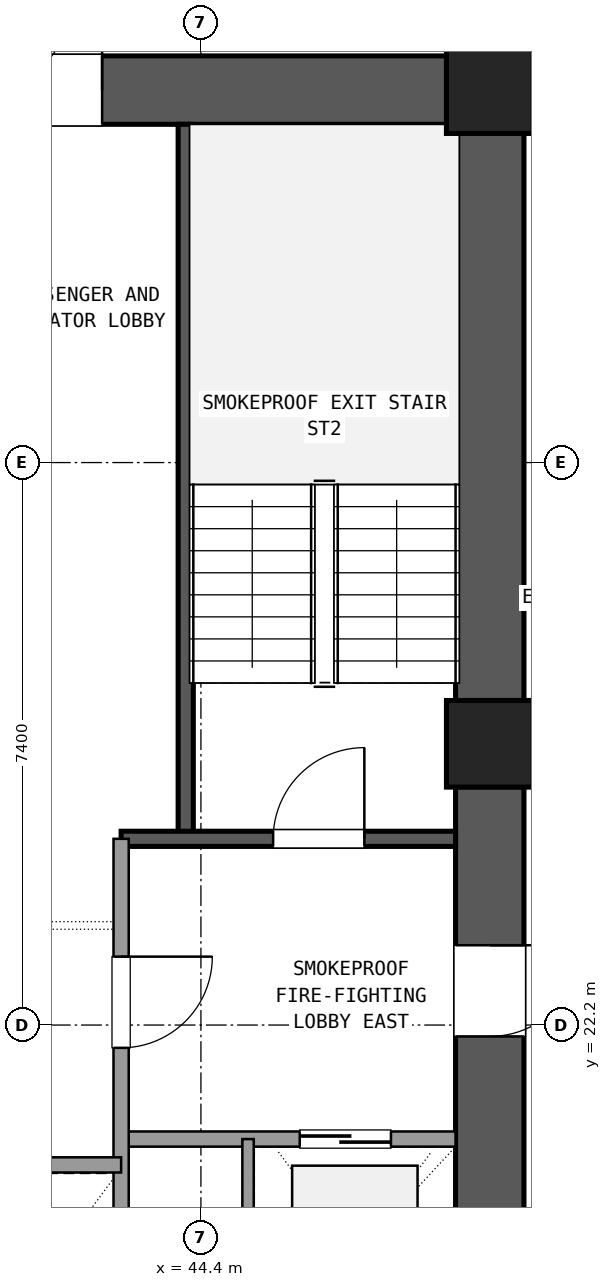
"""IFC4 building model, lengths in metres.
Left out: names, types, materials, properties, quantities, classifications, styles, units other than length and angle.
Written with IfcOpenShell. Run it as: python <this file> out.ifc"""

import sys

from ifc_helpers import new_model, si_unit, direction, frame, frame_2d, origin, origin_2d, place, context, subcontext, project, spatial, rectangle, extrude, element, fill, save


model = new_model("IFC4")
c1 = context("Model", 3, precision=1e-05, world=origin(), true_north=direction((0.0, 1.0)))
c2 = subcontext(c1, "Body", "Model", "MODEL_VIEW")
j1 = project(units=[si_unit("LENGTHUNIT", "METRE"), si_unit("PLANEANGLEUNIT", "RADIAN")], contexts=[c1])
p1 = place(None, origin())
s1 = spatial("IfcSite", under=j1, at=p1, CompositionType="ELEMENT")
p2 = place(p1, origin())
s2 = spatial("IfcBuilding", under=s1, at=p2, CompositionType="ELEMENT")
p3 = place(p2, frame((0.0, 0.0, 67.14)))
s3 = spatial("IfcBuildingStorey", under=s2, at=p3, CompositionType="ELEMENT", Elevation=67.14)
for number, where, z_axis, x_axis in (
    (1, (48.2, 25.9, 0.0), (0.0, 0.0, 1.0), (1.0, 0.0, 0.0)),
    (2, (48.2, 34.5, 0.0), (0.0, 0.0, 1.0), (1.0, 0.0, 0.0)),
):
    element("IfcColumn", number, at=place(p3, frame(where, z_axis=z_axis, x_axis=x_axis)), inside=s3, PredefinedType="COLUMN", context=c2, shape_type="SweptSolid", body=[
        extrude(rectangle(XDim=1.14, YDim=1.14, at=origin_2d()), origin(), (0.0, 0.0, 1.0), 3.6),
    ])
p4 = place(p3, frame((48.2, 17.865, 0.0), z_axis=(0.0, 0.0, 1.0), x_axis=(0.0, 1.0, 0.0)))
e3 = element("IfcWall", 3, at=p4, inside=s3, PredefinedType="SHEAR", context=c2, shape_type="SweptSolid", body=[
    extrude(rectangle(XDim=7.47, YDim=0.9, at=frame_2d((3.735, 0.0))), origin(), (0.0, 0.0, 1.0), 3.3),
])
p5 = place(p4, frame((4.185, 0.0, 0.0)))
e4 = element("IfcOpeningElement", 4, at=p5, cuts=e3, PredefinedType="OPENING", context=c2, shape_type="SweptSolid", body=[
    extrude(rectangle(XDim=1.2, YDim=2.15, at=frame_2d((0.6, 1.075))), frame((0.0, 0.46, 0.0), z_axis=(0.0, -1.0, 0.0), x_axis=(1.0, 0.0, 0.0)), (0.0, 0.0, 1.0), 0.92),
])
p6 = place(p3, frame((48.2, 26.465, 0.0), z_axis=(0.0, 0.0, 1.0), x_axis=(0.0, 1.0, 0.0)))
e5 = element("IfcWall", 5, at=p6, inside=s3, PredefinedType="SHEAR", context=c2, shape_type="SweptSolid", body=[
    extrude(rectangle(XDim=7.47, YDim=0.9, at=frame_2d((3.735, 0.0))), origin(), (0.0, 0.0, 1.0), 3.3),
])
p7 = place(p3, frame((47.635, 34.5, 0.0), z_axis=(0.0, 0.0, 1.0), x_axis=(-1.0, 0.0, 0.0)))
e6 = element("IfcWall", 6, at=p7, inside=s3, PredefinedType="SHEAR", context=c2, shape_type="SweptSolid", body=[
    extrude(rectangle(XDim=10.07, YDim=0.9, at=frame_2d((5.035, 0.0))), origin(), (0.0, 0.0, 1.0), 3.3),
])
p8 = place(p7, frame((4.535, 0.0, 0.0)))
e7 = element("IfcOpeningElement", 7, at=p8, cuts=e6, PredefinedType="OPENING", context=c2, shape_type="SweptSolid", body=[
    extrude(rectangle(XDim=1.6, YDim=2.2, at=frame_2d((0.8, 1.1))), frame((0.0, 0.46, 0.0), z_axis=(0.0, -1.0, 0.0), x_axis=(1.0, 0.0, 0.0)), (0.0, 0.0, 1.0), 0.92),
])
p9 = place(p3, frame((44.2, 24.65, 0.0), z_axis=(0.0, 0.0, 1.0), x_axis=(0.0, 1.0, 0.0)))
e8 = element("IfcWall", 8, at=p9, inside=s3, PredefinedType="SHEAR", context=c2, shape_type="SweptSolid", body=[
    extrude(rectangle(XDim=9.4, YDim=0.2, at=frame_2d((4.7, 0.0))), origin(), (0.0, 0.0, 1.0), 3.3),
])
p10 = place(p3, frame((43.35, 24.65, 0.0), z_axis=(0.0, 0.0, 1.0), x_axis=(1.0, 0.0, 0.0)))
e9 = element("IfcWall", 9, at=p10, inside=s3, PredefinedType="SHEAR", context=c2, shape_type="SweptSolid", body=[
    extrude(rectangle(XDim=4.4, YDim=0.2, at=frame_2d((2.2, 0.0))), origin(), (0.0, 0.0, 1.0), 3.3),
])
p11 = place(p10, frame((2.0, 0.0, 0.0)))
e10 = element("IfcOpeningElement", 10, at=p11, cuts=e9, PredefinedType="OPENING", context=c2, shape_type="SweptSolid", body=[
    extrude(rectangle(XDim=1.2, YDim=2.15, at=frame_2d((0.6, 1.075))), frame((0.0, 0.11, 0.0), z_axis=(0.0, -1.0, 0.0), x_axis=(1.0, 0.0, 0.0)), (0.0, 0.0, 1.0), 0.22),
])
p12 = place(p3, frame((43.35, 20.7, 0.0), z_axis=(0.0, 0.0, 1.0), x_axis=(1.0, 0.0, 0.0)))
e11 = element("IfcWall", 11, at=p12, inside=s3, PredefinedType="SOLIDWALL", context=c2, shape_type="SweptSolid", body=[
    extrude(rectangle(XDim=4.4, YDim=0.2, at=frame_2d((2.2, 0.0))), origin(), (0.0, 0.0, 1.0), 2.59),
])
p13 = place(p12, frame((2.35, 0.0, 0.0)))
e12 = element("IfcOpeningElement", 12, at=p13, cuts=e11, PredefinedType="OPENING", context=c2, shape_type="SweptSolid", body=[
    extrude(rectangle(XDim=1.2, YDim=2.15, at=frame_2d((0.6, 1.075))), frame((0.0, 0.11, 0.0), z_axis=(0.0, -1.0, 0.0), x_axis=(1.0, 0.0, 0.0)), (0.0, 0.0, 1.0), 0.22),
])
p14 = place(p3, frame((43.35, 17.75, 0.0), z_axis=(0.0, 0.0, 1.0), x_axis=(0.0, 1.0, 0.0)))
e13 = element("IfcWall", 13, at=p14, inside=s3, PredefinedType="SOLIDWALL", context=c2, shape_type="SweptSolid", body=[
    extrude(rectangle(XDim=6.9, YDim=0.2, at=frame_2d((3.45, 0.0))), origin(), (0.0, 0.0, 1.0), 2.59),
])
p15 = place(p14, frame((4.15, 0.0, 0.0)))
e14 = element("IfcOpeningElement", 14, at=p15, cuts=e13, PredefinedType="OPENING", context=c2, shape_type="SweptSolid", body=[
    extrude(rectangle(XDim=1.2, YDim=2.15, at=frame_2d((0.6, 1.075))), frame((0.0, 0.11, 0.0), z_axis=(0.0, -1.0, 0.0), x_axis=(1.0, 0.0, 0.0)), (0.0, 0.0, 1.0), 0.22),
])
p16 = place(p3, frame((45.02, 17.75, 0.0), z_axis=(0.0, 0.0, 1.0), x_axis=(0.0, 1.0, 0.0)))
e15 = element("IfcWall", 15, at=p16, inside=s3, PredefinedType="PARTITIONING", context=c2, shape_type="SweptSolid", body=[
    extrude(rectangle(XDim=2.95, YDim=0.15, at=frame_2d((1.475, 0.0))), origin(), (0.0, 0.0, 1.0), 2.59),
])
p17 = place(p3, frame((37.25, 20.36, 0.0), z_axis=(0.0, 0.0, 1.0), x_axis=(1.0, 0.0, 0.0)))
e16 = element("IfcWall", 16, at=p17, inside=s3, PredefinedType="SOLIDWALL", context=c2, shape_type="SweptSolid", body=[
    extrude(rectangle(XDim=6.1, YDim=0.2, at=frame_2d((3.05, 0.0))), origin(), (0.0, 0.0, 1.0), 2.59),
])
p18 = place(p11, origin())
e17 = element("IfcDoor", 17, at=p18, inside=s3, OperationType="SINGLE_SWING_RIGHT", PredefinedType="DOOR", context=c2, shape_type="SweptSolid", body=[
    extrude(rectangle(XDim=1.2, YDim=2.15, at=frame_2d((0.6, 1.075))), frame((0.0, 0.025, 0.0), z_axis=(0.0, -1.0, 0.0), x_axis=(1.0, 0.0, 0.0)), (0.0, 0.0, 1.0), 0.05),
])
fill(e10, e17)
p19 = place(p13, origin())
e18 = element("IfcDoor", 18, at=p19, inside=s3, OperationType="SLIDING_TO_RIGHT", PredefinedType="DOOR", context=c2, shape_type="SweptSolid", body=[
    extrude(rectangle(XDim=1.2, YDim=2.15, at=frame_2d((0.6, 1.075))), frame((0.0, 0.025, 0.0), z_axis=(0.0, -1.0, 0.0), x_axis=(1.0, 0.0, 0.0)), (0.0, 0.0, 1.0), 0.05),
])
fill(e12, e18)
p20 = place(p15, frame((1.2, 0.0, 0.0), z_axis=(0.0, 0.0, 1.0), x_axis=(-1.0, 0.0, 0.0)))
e19 = element("IfcDoor", 19, at=p20, inside=s3, OperationType="SINGLE_SWING_RIGHT", PredefinedType="DOOR", context=c2, shape_type="SweptSolid", body=[
    extrude(rectangle(XDim=1.2, YDim=2.15, at=frame_2d((0.6, 1.075))), frame((0.0, 0.025, 0.0), z_axis=(0.0, -1.0, 0.0), x_axis=(1.0, 0.0, 0.0)), (0.0, 0.0, 1.0), 0.05),
])
fill(e14, e19)
p21 = place(p5, frame((1.2, 0.0, 0.0), z_axis=(0.0, 0.0, 1.0), x_axis=(-1.0, 0.0, 0.0)))
e20 = element("IfcDoor", 20, at=p21, inside=s3, OperationType="SINGLE_SWING_RIGHT", PredefinedType="DOOR", context=c2, shape_type="SweptSolid", body=[
    extrude(rectangle(XDim=1.2, YDim=2.15, at=frame_2d((0.6, 1.075))), frame((0.0, 0.025, 0.0), z_axis=(0.0, -1.0, 0.0), x_axis=(1.0, 0.0, 0.0)), (0.0, 0.0, 1.0), 0.05),
])
fill(e4, e20)
p22 = place(p8, frame((1.6, 0.0, 0.0), z_axis=(0.0, 0.0, 1.0), x_axis=(-1.0, 0.0, 0.0)))
e21 = element("IfcDoor", 21, at=p22, inside=s3, OperationType="DOUBLE_DOOR_SINGLE_SWING", PredefinedType="DOOR", context=c2, shape_type="SweptSolid", body=[
    extrude(rectangle(XDim=1.6, YDim=2.2, at=frame_2d((0.8, 1.1))), frame((0.0, 0.025, 0.0), z_axis=(0.0, -1.0, 0.0), x_axis=(1.0, 0.0, 0.0)), (0.0, 0.0, 1.0), 0.05),
])
fill(e7, e21)
save(model, sys.argv[1])
